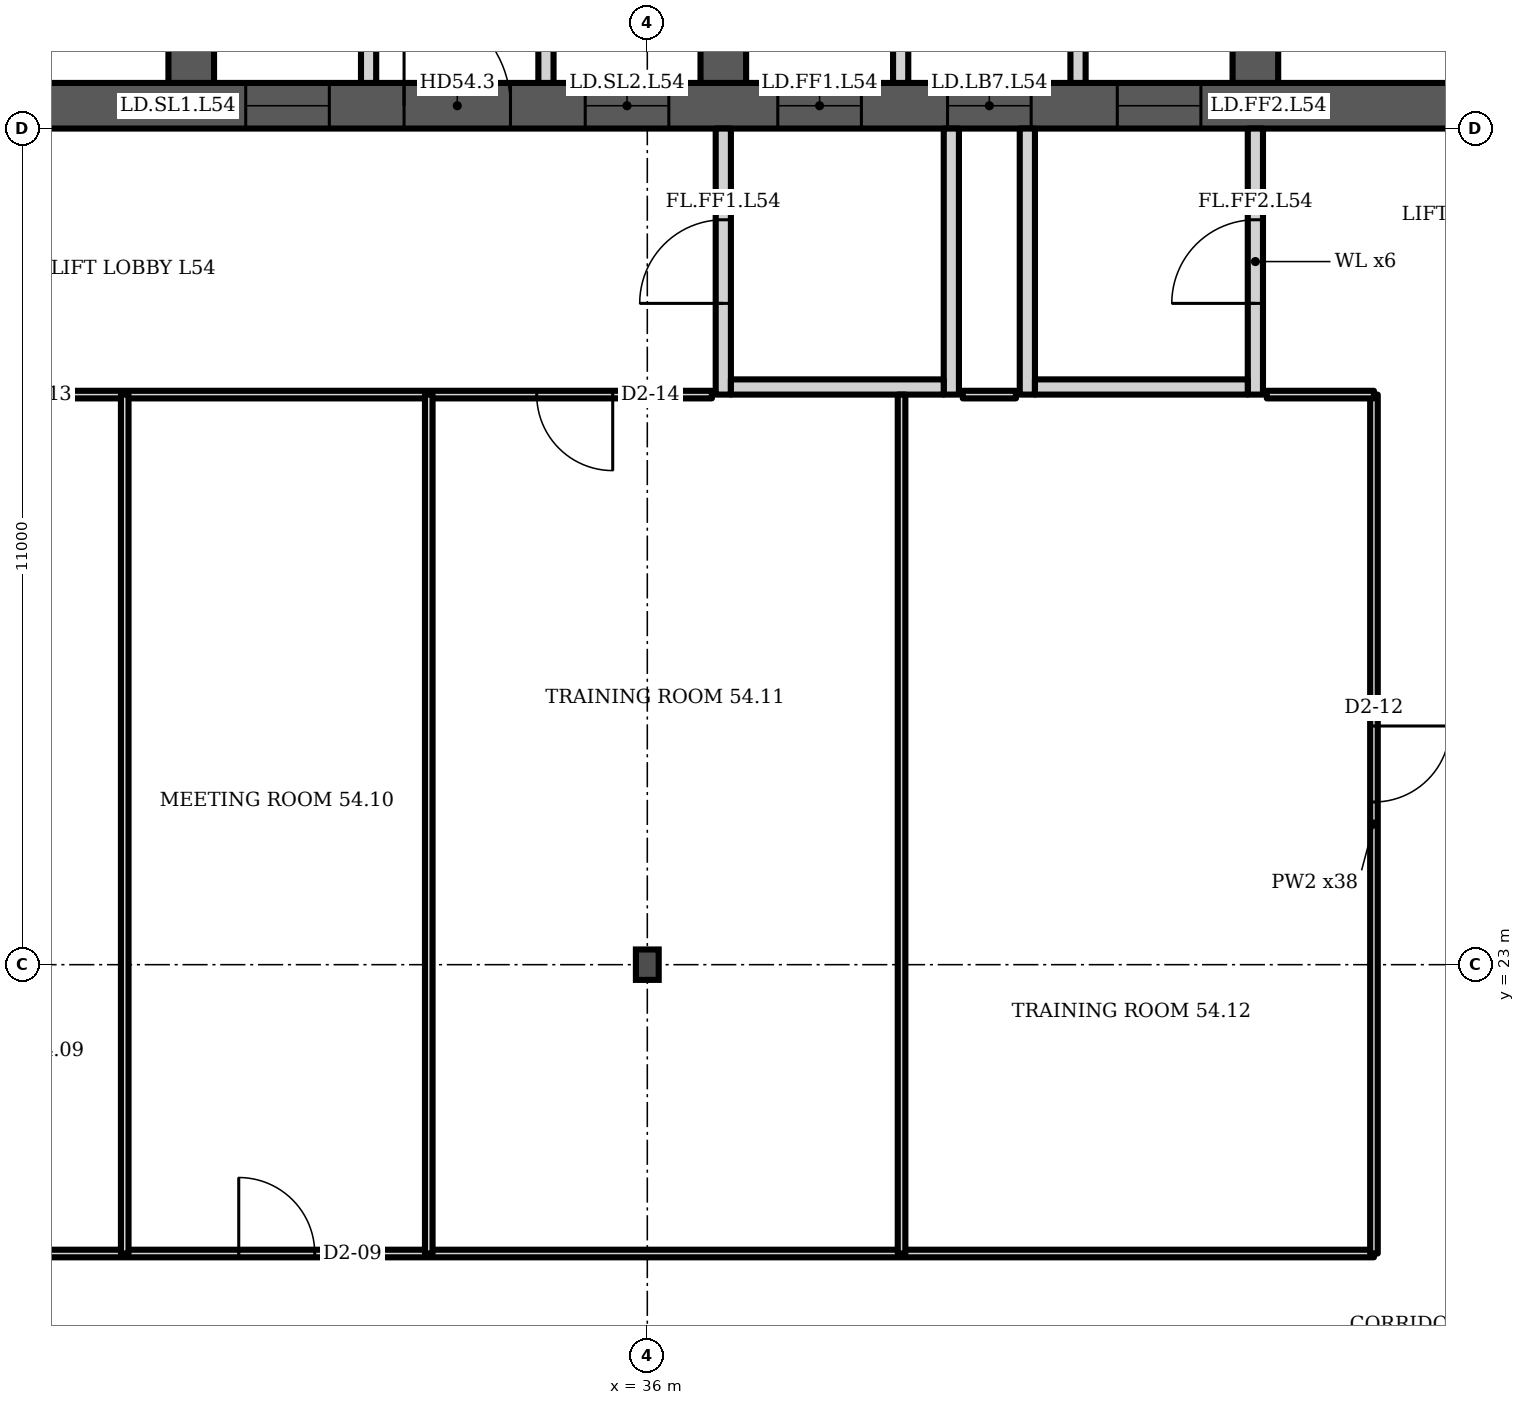
"""IFC4 building model, lengths in metres.
Left out: names, types, materials, properties, quantities, classifications, styles, units other than length and angle.
Written with IfcOpenShell. Run it as: python <this file> out.ifc"""

import sys

from ifc_helpers import new_model, si_unit, direction, frame, frame_2d, origin, origin_2d, place, context, subcontext, project, spatial, polyline, rectangle, i_section, outline, extrude, element, fill, save


model = new_model("IFC4")
c1 = context("Model", 3, precision=1e-05, world=origin(), true_north=direction((0.0, 1.0)))
c2 = subcontext(c1, "Body", "Model", "MODEL_VIEW")
j1 = project(units=[si_unit("LENGTHUNIT", "METRE"), si_unit("PLANEANGLEUNIT", "RADIAN")], contexts=[c1])
p1 = place(None, origin())
s1 = spatial("IfcSite", under=j1, at=p1, CompositionType="ELEMENT")
p2 = place(p1, origin())
s2 = spatial("IfcBuilding", under=s1, at=p2, CompositionType="ELEMENT")
p3 = place(p2, frame((0.0, 0.0, 217.9)))
s3 = spatial("IfcBuildingStorey", under=s2, at=p3, CompositionType="ELEMENT", Elevation=217.9)
p4 = place(p3, frame((23.0, 34.3, 0.0), z_axis=(0.0, 0.0, 1.0), x_axis=(1.0, 0.0, 0.0)))
e1 = element("IfcWall", 1, at=p4, inside=s3, PredefinedType="SHEAR", context=c2, shape_type="SweptSolid", body=[
    extrude(rectangle(XDim=35.0, YDim=0.6, at=frame_2d((17.5, 0.0))), origin(), (0.0, 0.0, 1.0), 3.6),
])
p5 = place(p4, frame((0.65, 0.0, 0.0)))
e2 = element("IfcOpeningElement", 2, at=p5, cuts=e1, PredefinedType="OPENING", context=c2, shape_type="SweptSolid", body=[
    extrude(rectangle(XDim=1.2, YDim=2.1, at=frame_2d((0.6, 1.05))), frame((0.0, 0.31, 0.0), z_axis=(0.0, -1.0, 0.0), x_axis=(1.0, 0.0, 0.0)), (0.0, 0.0, 1.0), 0.62),
])
p6 = place(p4, frame((7.717, 0.0, 0.0)))
e3 = element("IfcOpeningElement", 3, at=p6, cuts=e1, PredefinedType="OPENING", context=c2, shape_type="SweptSolid", body=[
    extrude(rectangle(XDim=1.1, YDim=2.1, at=frame_2d((0.55, 1.05))), frame((0.0, 0.31, 0.0), z_axis=(0.0, -1.0, 0.0), x_axis=(1.0, 0.0, 0.0)), (0.0, 0.0, 1.0), 0.62),
])
p7 = place(p4, frame((12.183, 0.0, 0.0)))
e4 = element("IfcOpeningElement", 4, at=p7, cuts=e1, PredefinedType="OPENING", context=c2, shape_type="SweptSolid", body=[
    extrude(rectangle(XDim=1.1, YDim=2.1, at=frame_2d((0.55, 1.05))), frame((0.0, 0.31, 0.0), z_axis=(0.0, -1.0, 0.0), x_axis=(1.0, 0.0, 0.0)), (0.0, 0.0, 1.0), 0.62),
])
p8 = place(p4, frame((9.8, 0.0, 0.0)))
e5 = element("IfcOpeningElement", 5, at=p8, cuts=e1, PredefinedType="OPENING", context=c2, shape_type="SweptSolid", body=[
    extrude(rectangle(XDim=1.4, YDim=2.1, at=frame_2d((0.7, 1.05))), frame((0.0, 0.31, 0.0), z_axis=(0.0, -1.0, 0.0), x_axis=(1.0, 0.0, 0.0)), (0.0, 0.0, 1.0), 0.62),
])
p9 = place(p4, frame((14.717, 0.0, 0.0)))
e6 = element("IfcOpeningElement", 6, at=p9, cuts=e1, PredefinedType="OPENING", context=c2, shape_type="SweptSolid", body=[
    extrude(rectangle(XDim=1.1, YDim=2.1, at=frame_2d((0.55, 1.05))), frame((0.0, 0.31, 0.0), z_axis=(0.0, -1.0, 0.0), x_axis=(1.0, 0.0, 0.0)), (0.0, 0.0, 1.0), 0.62),
])
p10 = place(p4, frame((16.95, 0.0, 0.0)))
e7 = element("IfcOpeningElement", 7, at=p10, cuts=e1, PredefinedType="OPENING", context=c2, shape_type="SweptSolid", body=[
    extrude(rectangle(XDim=1.1, YDim=2.1, at=frame_2d((0.55, 1.05))), frame((0.0, 0.31, 0.0), z_axis=(0.0, -1.0, 0.0), x_axis=(1.0, 0.0, 0.0)), (0.0, 0.0, 1.0), 0.62),
])
p11 = place(p4, frame((19.183, 0.0, 0.0)))
e8 = element("IfcOpeningElement", 8, at=p11, cuts=e1, PredefinedType="OPENING", context=c2, shape_type="SweptSolid", body=[
    extrude(rectangle(XDim=1.1, YDim=2.1, at=frame_2d((0.55, 1.05))), frame((0.0, 0.31, 0.0), z_axis=(0.0, -1.0, 0.0), x_axis=(1.0, 0.0, 0.0)), (0.0, 0.0, 1.0), 0.62),
])
p12 = place(p4, frame((26.15, 0.0, 0.0)))
e9 = element("IfcOpeningElement", 9, at=p12, cuts=e1, PredefinedType="OPENING", context=c2, shape_type="SweptSolid", body=[
    extrude(rectangle(XDim=1.2, YDim=2.1, at=frame_2d((0.6, 1.05))), frame((0.0, 0.31, 0.0), z_axis=(0.0, -1.0, 0.0), x_axis=(1.0, 0.0, 0.0)), (0.0, 0.0, 1.0), 0.62),
])
p13 = place(p4, frame((28.767, 0.0, 0.0)))
e10 = element("IfcOpeningElement", 10, at=p13, cuts=e1, PredefinedType="OPENING", context=c2, shape_type="SweptSolid", body=[
    extrude(rectangle(XDim=1.0, YDim=2.1, at=frame_2d((0.5, 1.05))), frame((0.0, 0.31, 0.0), z_axis=(0.0, -1.0, 0.0), x_axis=(1.0, 0.0, 0.0)), (0.0, 0.0, 1.0), 0.62),
])
p14 = place(p4, frame((33.083, 0.0, 0.0)))
e11 = element("IfcOpeningElement", 11, at=p14, cuts=e1, PredefinedType="OPENING", context=c2, shape_type="SweptSolid", body=[
    extrude(rectangle(XDim=1.0, YDim=2.1, at=frame_2d((0.5, 1.05))), frame((0.0, 0.31, 0.0), z_axis=(0.0, -1.0, 0.0), x_axis=(1.0, 0.0, 0.0)), (0.0, 0.0, 1.0), 0.62),
])
p15 = place(p4, frame((30.8, 0.0, 0.0)))
e12 = element("IfcOpeningElement", 12, at=p15, cuts=e1, PredefinedType="OPENING", context=c2, shape_type="SweptSolid", body=[
    extrude(rectangle(XDim=1.4, YDim=2.1, at=frame_2d((0.7, 1.05))), frame((0.0, 0.31, 0.0), z_axis=(0.0, -1.0, 0.0), x_axis=(1.0, 0.0, 0.0)), (0.0, 0.0, 1.0), 0.62),
])
p16 = place(p3, frame((30.0, 34.6, 0.0), z_axis=(0.0, 0.0, 1.0), x_axis=(0.0, 1.0, 0.0)))
e13 = element("IfcWall", 13, at=p16, inside=s3, PredefinedType="SHEAR", context=c2, shape_type="SweptSolid", body=[
    extrude(rectangle(XDim=14.171, YDim=0.6, at=frame_2d((7.085, 0.0))), origin(), (0.0, 0.0, 1.0), 3.6),
])
p17 = place(p16, frame((3.8, 0.0, 0.0)))
e14 = element("IfcOpeningElement", 14, at=p17, cuts=e13, PredefinedType="OPENING", context=c2, shape_type="SweptSolid", body=[
    extrude(rectangle(XDim=1.1, YDim=2.1, at=frame_2d((0.55, 1.05))), frame((0.0, 0.31, 0.0), z_axis=(0.0, -1.0, 0.0), x_axis=(1.0, 0.0, 0.0)), (0.0, 0.0, 1.0), 0.62),
])
p18 = place(p3, frame((37.0, 34.6, 0.0), z_axis=(0.0, 0.0, 1.0), x_axis=(0.0, 1.0, 0.0)))
e15 = element("IfcWall", 15, at=p18, inside=s3, PredefinedType="SHEAR", context=c2, shape_type="SweptSolid", body=[
    extrude(rectangle(XDim=14.784, YDim=0.6, at=frame_2d((7.392, 0.0))), origin(), (0.0, 0.0, 1.0), 3.6),
])
p19 = place(p18, frame((11.302, 0.0, 0.0)))
e16 = element("IfcOpeningElement", 16, at=p19, cuts=e15, PredefinedType="OPENING", context=c2, shape_type="SweptSolid", body=[
    extrude(rectangle(XDim=1.0, YDim=2.1, at=frame_2d((0.5, 1.05))), frame((0.0, 0.31, 0.0), z_axis=(0.0, -1.0, 0.0), x_axis=(1.0, 0.0, 0.0)), (0.0, 0.0, 1.0), 0.62),
])
p20 = place(p18, frame((3.8, 0.0, 0.0)))
e17 = element("IfcOpeningElement", 17, at=p20, cuts=e15, PredefinedType="OPENING", context=c2, shape_type="SweptSolid", body=[
    extrude(rectangle(XDim=1.1, YDim=2.1, at=frame_2d((0.55, 1.05))), frame((0.0, 0.31, 0.0), z_axis=(0.0, -1.0, 0.0), x_axis=(1.0, 0.0, 0.0)), (0.0, 0.0, 1.0), 0.62),
])
p21 = place(p3, frame((44.0, 34.6, 0.0), z_axis=(0.0, 0.0, 1.0), x_axis=(0.0, 1.0, 0.0)))
e18 = element("IfcWall", 18, at=p21, inside=s3, PredefinedType="SHEAR", context=c2, shape_type="SweptSolid", body=[
    extrude(rectangle(XDim=14.784, YDim=0.6, at=frame_2d((7.392, 0.0))), origin(), (0.0, 0.0, 1.0), 3.6),
])
p22 = place(p21, frame((11.608, 0.0, 0.0)))
e19 = element("IfcOpeningElement", 19, at=p22, cuts=e18, PredefinedType="OPENING", context=c2, shape_type="SweptSolid", body=[
    extrude(rectangle(XDim=1.0, YDim=2.1, at=frame_2d((0.5, 1.05))), frame((0.0, 0.31, 0.0), z_axis=(0.0, -1.0, 0.0), x_axis=(1.0, 0.0, 0.0)), (0.0, 0.0, 1.0), 0.62),
])
p23 = place(p21, frame((3.8, 0.0, 0.0)))
e20 = element("IfcOpeningElement", 20, at=p23, cuts=e18, PredefinedType="OPENING", context=c2, shape_type="SweptSolid", body=[
    extrude(rectangle(XDim=1.1, YDim=2.1, at=frame_2d((0.55, 1.05))), frame((0.0, 0.31, 0.0), z_axis=(0.0, -1.0, 0.0), x_axis=(1.0, 0.0, 0.0)), (0.0, 0.0, 1.0), 0.62),
])
p24 = place(p3, frame((36.0, 23.0, 0.0), z_axis=(0.0, 0.0, 1.0), x_axis=(1.0, 0.0, 0.0)))
e21 = element("IfcColumn", 21, at=p24, inside=s3, PredefinedType="COLUMN", context=c2, shape_type="SweptSolid", body=[
    extrude(i_section(OverallWidth=0.3, OverallDepth=0.4, WebThickness=0.013, FlangeThickness=0.024, FilletRadius=0.027, at=origin_2d()), origin(), (0.0, 0.0, 1.0), 3.6),
])
p25 = place(p3, origin())
e22 = element("IfcWall", 22, at=p25, inside=s3, PredefinedType="PARTITIONING", context=c2, shape_type="SweptSolid", body=[
    extrude(outline(polyline([(32.233, 37.45), (30.3, 37.45), (30.3, 37.65), (32.233, 37.65), (32.433, 37.65), (32.433, 34.6), (32.233, 34.6), (32.233, 37.45)])), origin(), (0.0, 0.0, 1.0), 3.2),
])
p26 = place(p3, origin())
e23 = element("IfcWall", 23, at=p26, inside=s3, PredefinedType="PARTITIONING", context=c2, shape_type="SweptSolid", body=[
    extrude(outline(polyline([(34.567, 37.65), (34.767, 37.65), (36.7, 37.65), (36.7, 37.45), (34.767, 37.45), (34.767, 34.6), (34.567, 34.6), (34.567, 37.65)])), origin(), (0.0, 0.0, 1.0), 3.2),
])
p27 = place(p3, origin())
e24 = element("IfcWall", 24, at=p27, inside=s3, PredefinedType="PARTITIONING", context=c2, shape_type="SweptSolid", body=[
    extrude(outline(polyline([(41.567, 37.1), (39.433, 37.1), (39.433, 34.6), (39.233, 34.6), (39.233, 37.45), (37.3, 37.45), (37.3, 37.65), (39.233, 37.65), (39.433, 37.65), (39.433, 37.3), (41.567, 37.3), (41.567, 37.35), (41.767, 37.35), (43.7, 37.35), (43.7, 37.15), (41.767, 37.15), (41.767, 34.6), (41.567, 34.6), (41.567, 37.1)])), origin(), (0.0, 0.0, 1.0), 3.2),
])
p28 = place(p3, frame((37.0, 30.5, 0.0), z_axis=(0.0, 0.0, 1.0), x_axis=(0.0, 1.0, 0.0)))
e25 = element("IfcWall", 25, at=p28, inside=s3, PredefinedType="PARTITIONING", context=c2, shape_type="SweptSolid", body=[
    extrude(rectangle(XDim=3.5, YDim=0.2, at=frame_2d((1.75, 0.0))), origin(), (0.0, 0.0, 1.0), 3.2),
])
p29 = place(p28, frame((1.2, 0.0, 0.0)))
e26 = element("IfcOpeningElement", 26, at=p29, cuts=e25, PredefinedType="OPENING", context=c2, shape_type="SweptSolid", body=[
    extrude(rectangle(XDim=1.1, YDim=2.1, at=frame_2d((0.55, 1.05))), frame((0.0, 0.11, 0.0), z_axis=(0.0, -1.0, 0.0), x_axis=(1.0, 0.0, 0.0)), (0.0, 0.0, 1.0), 0.22),
])
p30 = place(p3, frame((40.0, 30.5, 0.0), z_axis=(0.0, 0.0, 1.0), x_axis=(0.0, 1.0, 0.0)))
e27 = element("IfcWall", 27, at=p30, inside=s3, PredefinedType="PARTITIONING", context=c2, shape_type="SweptSolid", body=[
    extrude(rectangle(XDim=3.5, YDim=0.2, at=frame_2d((1.75, 0.0))), origin(), (0.0, 0.0, 1.0), 3.2),
])
p31 = place(p3, frame((37.1, 30.6, 0.0), z_axis=(0.0, 0.0, 1.0), x_axis=(1.0, 0.0, 0.0)))
e28 = element("IfcWall", 28, at=p31, inside=s3, PredefinedType="PARTITIONING", context=c2, shape_type="SweptSolid", body=[
    extrude(rectangle(XDim=2.8, YDim=0.2, at=frame_2d((1.4, 0.0))), origin(), (0.0, 0.0, 1.0), 3.2),
])
p32 = place(p3, frame((41.0, 30.5, 0.0), z_axis=(0.0, 0.0, 1.0), x_axis=(0.0, 1.0, 0.0)))
e29 = element("IfcWall", 29, at=p32, inside=s3, PredefinedType="PARTITIONING", context=c2, shape_type="SweptSolid", body=[
    extrude(rectangle(XDim=3.5, YDim=0.2, at=frame_2d((1.75, 0.0))), origin(), (0.0, 0.0, 1.0), 3.2),
])
p33 = place(p3, frame((44.0, 30.5, 0.0), z_axis=(0.0, 0.0, 1.0), x_axis=(0.0, 1.0, 0.0)))
e30 = element("IfcWall", 30, at=p33, inside=s3, PredefinedType="PARTITIONING", context=c2, shape_type="SweptSolid", body=[
    extrude(rectangle(XDim=3.5, YDim=0.2, at=frame_2d((1.75, 0.0))), origin(), (0.0, 0.0, 1.0), 3.2),
])
p34 = place(p33, frame((1.2, 0.0, 0.0)))
e31 = element("IfcOpeningElement", 31, at=p34, cuts=e30, PredefinedType="OPENING", context=c2, shape_type="SweptSolid", body=[
    extrude(rectangle(XDim=1.1, YDim=2.1, at=frame_2d((0.55, 1.05))), frame((0.0, 0.11, 0.0), z_axis=(0.0, -1.0, 0.0), x_axis=(1.0, 0.0, 0.0)), (0.0, 0.0, 1.0), 0.22),
])
p35 = place(p3, frame((41.1, 30.6, 0.0), z_axis=(0.0, 0.0, 1.0), x_axis=(1.0, 0.0, 0.0)))
e32 = element("IfcWall", 32, at=p35, inside=s3, PredefinedType="PARTITIONING", context=c2, shape_type="SweptSolid", body=[
    extrude(rectangle(XDim=2.8, YDim=0.2, at=frame_2d((1.4, 0.0))), origin(), (0.0, 0.0, 1.0), 3.2),
])
p36 = place(p3, frame((23.0, 30.5, 0.0), z_axis=(0.0, 0.0, 1.0), x_axis=(1.0, 0.0, 0.0)))
e33 = element("IfcWall", 33, at=p36, inside=s3, PredefinedType="PARTITIONING", context=c2, shape_type="SweptSolid", body=[
    extrude(rectangle(XDim=13.85, YDim=0.1, at=frame_2d((6.925, 0.0))), origin(), (0.0, 0.0, 1.0), 3.2),
])
p37 = place(p36, frame((3.545, 0.0, 0.0)))
e34 = element("IfcOpeningElement", 34, at=p37, cuts=e33, PredefinedType="OPENING", context=c2, shape_type="SweptSolid", body=[
    extrude(rectangle(XDim=1.0, YDim=2.1, at=frame_2d((0.5, 1.05))), frame((0.0, 0.06, 0.0), z_axis=(0.0, -1.0, 0.0), x_axis=(1.0, 0.0, 0.0)), (0.0, 0.0, 1.0), 0.12),
])
p38 = place(p36, frame((11.545, 0.0, 0.0)))
e35 = element("IfcOpeningElement", 35, at=p38, cuts=e33, PredefinedType="OPENING", context=c2, shape_type="SweptSolid", body=[
    extrude(rectangle(XDim=1.0, YDim=2.1, at=frame_2d((0.5, 1.05))), frame((0.0, 0.06, 0.0), z_axis=(0.0, -1.0, 0.0), x_axis=(1.0, 0.0, 0.0)), (0.0, 0.0, 1.0), 0.12),
])
p39 = place(p3, frame((24.8, 19.2, 0.0), z_axis=(0.0, 0.0, 1.0), x_axis=(1.0, 0.0, 0.0)))
e36 = element("IfcWall", 36, at=p39, inside=s3, PredefinedType="PARTITIONING", context=c2, shape_type="SweptSolid", body=[
    extrude(rectangle(XDim=20.76, YDim=0.1, at=frame_2d((10.38, 0.0))), origin(), (0.0, 0.0, 1.0), 3.2),
])
p40 = place(p39, frame((5.825, 0.0, 0.0)))
e37 = element("IfcOpeningElement", 37, at=p40, cuts=e36, PredefinedType="OPENING", context=c2, shape_type="SweptSolid", body=[
    extrude(rectangle(XDim=1.0, YDim=2.1, at=frame_2d((0.5, 1.05))), frame((0.0, 0.06, 0.0), z_axis=(0.0, -1.0, 0.0), x_axis=(1.0, 0.0, 0.0)), (0.0, 0.0, 1.0), 0.12),
])
for number, where, z_axis, x_axis in (
    (38, (29.125, 19.2, 0.0), (0.0, 0.0, 1.0), (0.0, 1.0, 0.0)),
    (39, (33.125, 19.2, 0.0), (0.0, 0.0, 1.0), (0.0, 1.0, 0.0)),
    (40, (39.345, 19.2, 0.0), (0.0, 0.0, 1.0), (0.0, 1.0, 0.0)),
):
    element("IfcWall", number, at=place(p3, frame(where, z_axis=z_axis, x_axis=x_axis)), inside=s3, PredefinedType="PARTITIONING", context=c2, shape_type="SweptSolid", body=[
        extrude(rectangle(XDim=11.3, YDim=0.1, at=frame_2d((5.65, 0.0))), origin(), (0.0, 0.0, 1.0), 3.2),
    ])
p41 = place(p3, frame((45.56, 19.2, 0.0), z_axis=(0.0, 0.0, 1.0), x_axis=(0.0, 1.0, 0.0)))
e41 = element("IfcWall", 41, at=p41, inside=s3, PredefinedType="PARTITIONING", context=c2, shape_type="SweptSolid", body=[
    extrude(rectangle(XDim=11.3, YDim=0.1, at=frame_2d((5.65, 0.0))), origin(), (0.0, 0.0, 1.0), 3.2),
])
p42 = place(p41, frame((5.94, 0.0, 0.0)))
e42 = element("IfcOpeningElement", 42, at=p42, cuts=e41, PredefinedType="OPENING", context=c2, shape_type="SweptSolid", body=[
    extrude(rectangle(XDim=1.0, YDim=2.1, at=frame_2d((0.5, 1.05))), frame((0.0, 0.06, 0.0), z_axis=(0.0, -1.0, 0.0), x_axis=(1.0, 0.0, 0.0)), (0.0, 0.0, 1.0), 0.12),
])
p43 = place(p3, frame((40.15, 30.5, 0.0), z_axis=(0.0, 0.0, 1.0), x_axis=(1.0, 0.0, 0.0)))
e43 = element("IfcWall", 43, at=p43, inside=s3, PredefinedType="PARTITIONING", context=c2, shape_type="SweptSolid", body=[
    extrude(rectangle(XDim=0.7, YDim=0.1, at=frame_2d((0.35, 0.0))), origin(), (0.0, 0.0, 1.0), 3.2),
])
p44 = place(p3, frame((44.15, 30.5, 0.0), z_axis=(0.0, 0.0, 1.0), x_axis=(1.0, 0.0, 0.0)))
e44 = element("IfcWall", 44, at=p44, inside=s3, PredefinedType="PARTITIONING", context=c2, shape_type="SweptSolid", body=[
    extrude(rectangle(XDim=1.41, YDim=0.1, at=frame_2d((0.705, 0.0))), origin(), (0.0, 0.0, 1.0), 3.2),
])
p45 = place(p6, origin())
e45 = element("IfcDoor", 45, at=p45, inside=s3, OperationType="DOUBLE_DOOR_SLIDING", PredefinedType="DOOR", context=c2, shape_type="SweptSolid", body=[
    extrude(rectangle(XDim=1.1, YDim=2.1, at=frame_2d((0.55, 1.05))), frame((0.0, 0.025, 0.0), z_axis=(0.0, -1.0, 0.0), x_axis=(1.0, 0.0, 0.0)), (0.0, 0.0, 1.0), 0.05),
])
fill(e3, e45)
p46 = place(p7, origin())
e46 = element("IfcDoor", 46, at=p46, inside=s3, OperationType="DOUBLE_DOOR_SLIDING", PredefinedType="DOOR", context=c2, shape_type="SweptSolid", body=[
    extrude(rectangle(XDim=1.1, YDim=2.1, at=frame_2d((0.55, 1.05))), frame((0.0, 0.025, 0.0), z_axis=(0.0, -1.0, 0.0), x_axis=(1.0, 0.0, 0.0)), (0.0, 0.0, 1.0), 0.05),
])
fill(e4, e46)
p47 = place(p8, origin())
e47 = element("IfcDoor", 47, at=p47, inside=s3, OperationType="DOUBLE_DOOR_SINGLE_SWING", PredefinedType="DOOR", context=c2, shape_type="SweptSolid", body=[
    extrude(rectangle(XDim=1.4, YDim=2.1, at=frame_2d((0.7, 1.05))), frame((0.0, 0.025, 0.0), z_axis=(0.0, -1.0, 0.0), x_axis=(1.0, 0.0, 0.0)), (0.0, 0.0, 1.0), 0.05),
])
fill(e5, e47)
p48 = place(p9, origin())
e48 = element("IfcDoor", 48, at=p48, inside=s3, OperationType="DOUBLE_DOOR_SLIDING", PredefinedType="DOOR", context=c2, shape_type="SweptSolid", body=[
    extrude(rectangle(XDim=1.1, YDim=2.1, at=frame_2d((0.55, 1.05))), frame((0.0, 0.025, 0.0), z_axis=(0.0, -1.0, 0.0), x_axis=(1.0, 0.0, 0.0)), (0.0, 0.0, 1.0), 0.05),
])
fill(e6, e48)
p49 = place(p10, origin())
e49 = element("IfcDoor", 49, at=p49, inside=s3, OperationType="DOUBLE_DOOR_SLIDING", PredefinedType="DOOR", context=c2, shape_type="SweptSolid", body=[
    extrude(rectangle(XDim=1.1, YDim=2.1, at=frame_2d((0.55, 1.05))), frame((0.0, 0.025, 0.0), z_axis=(0.0, -1.0, 0.0), x_axis=(1.0, 0.0, 0.0)), (0.0, 0.0, 1.0), 0.05),
])
fill(e7, e49)
p50 = place(p11, origin())
e50 = element("IfcDoor", 50, at=p50, inside=s3, OperationType="DOUBLE_DOOR_SLIDING", PredefinedType="DOOR", context=c2, shape_type="SweptSolid", body=[
    extrude(rectangle(XDim=1.1, YDim=2.1, at=frame_2d((0.55, 1.05))), frame((0.0, 0.025, 0.0), z_axis=(0.0, -1.0, 0.0), x_axis=(1.0, 0.0, 0.0)), (0.0, 0.0, 1.0), 0.05),
])
fill(e8, e50)
p51 = place(p29, origin())
e51 = element("IfcDoor", 51, at=p51, inside=s3, OperationType="SINGLE_SWING_LEFT", PredefinedType="DOOR", context=c2, shape_type="SweptSolid", body=[
    extrude(rectangle(XDim=1.1, YDim=2.1, at=frame_2d((0.55, 1.05))), frame((0.0, 0.025, 0.0), z_axis=(0.0, -1.0, 0.0), x_axis=(1.0, 0.0, 0.0)), (0.0, 0.0, 1.0), 0.05),
])
fill(e26, e51)
p52 = place(p34, origin())
e52 = element("IfcDoor", 52, at=p52, inside=s3, OperationType="SINGLE_SWING_LEFT", PredefinedType="DOOR", context=c2, shape_type="SweptSolid", body=[
    extrude(rectangle(XDim=1.1, YDim=2.1, at=frame_2d((0.55, 1.05))), frame((0.0, 0.025, 0.0), z_axis=(0.0, -1.0, 0.0), x_axis=(1.0, 0.0, 0.0)), (0.0, 0.0, 1.0), 0.05),
])
fill(e31, e52)
p53 = place(p40, origin())
e53 = element("IfcDoor", 53, at=p53, inside=s3, OperationType="SINGLE_SWING_LEFT", PredefinedType="DOOR", context=c2, shape_type="SweptSolid", body=[
    extrude(rectangle(XDim=1.0, YDim=2.1, at=frame_2d((0.5, 1.05))), frame((0.0, 0.025, 0.0), z_axis=(0.0, -1.0, 0.0), x_axis=(1.0, 0.0, 0.0)), (0.0, 0.0, 1.0), 0.05),
])
fill(e37, e53)
p54 = place(p42, origin())
e54 = element("IfcDoor", 54, at=p54, inside=s3, OperationType="SINGLE_SWING_RIGHT", PredefinedType="DOOR", context=c2, shape_type="SweptSolid", body=[
    extrude(rectangle(XDim=1.0, YDim=2.1, at=frame_2d((0.5, 1.05))), frame((0.0, 0.025, 0.0), z_axis=(0.0, -1.0, 0.0), x_axis=(1.0, 0.0, 0.0)), (0.0, 0.0, 1.0), 0.05),
])
fill(e42, e54)
p55 = place(p38, origin())
e55 = element("IfcDoor", 55, at=p55, inside=s3, OperationType="SINGLE_SWING_RIGHT", PredefinedType="DOOR", context=c2, shape_type="SweptSolid", body=[
    extrude(rectangle(XDim=1.0, YDim=2.1, at=frame_2d((0.5, 1.05))), frame((0.0, 0.025, 0.0), z_axis=(0.0, -1.0, 0.0), x_axis=(1.0, 0.0, 0.0)), (0.0, 0.0, 1.0), 0.05),
])
fill(e35, e55)
save(model, sys.argv[1])
